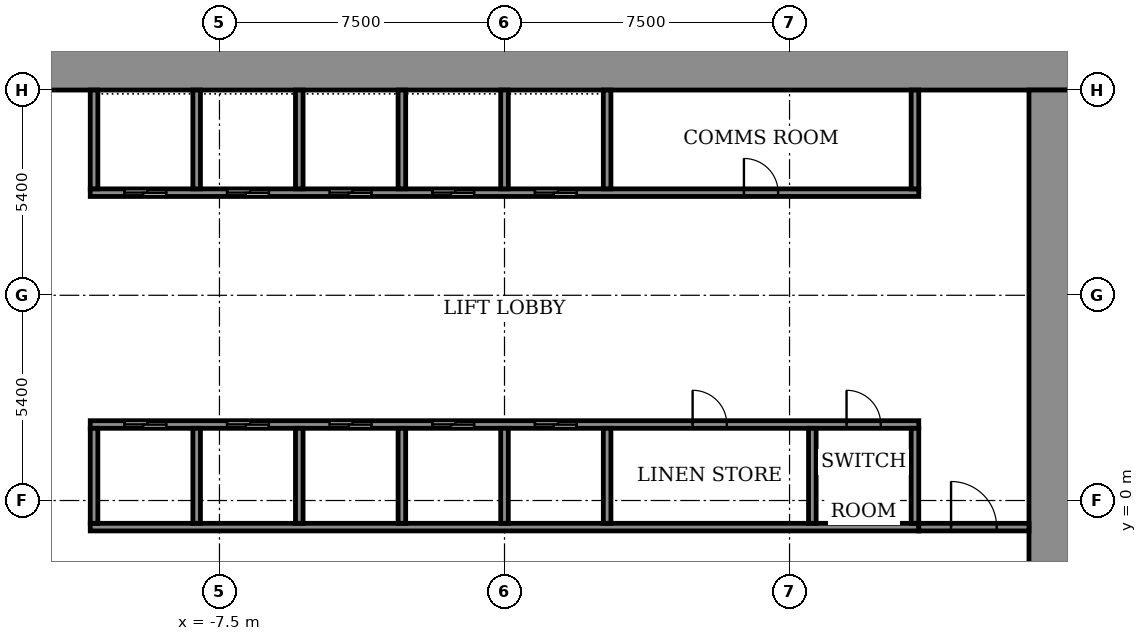
"""IFC4 building model, lengths in metres.
Left out: names, types, materials, properties, quantities, classifications, styles, units other than length and angle.
Written with IfcOpenShell. Run it as: python <this file> out.ifc"""

import sys

from ifc_helpers import new_model, si_unit, direction, frame, frame_2d, origin, place, context, subcontext, project, spatial, rectangle, extrude, element, fill, save


model = new_model("IFC4")
c1 = context("Model", 3, precision=1e-05, world=origin(), true_north=direction((0.0, 1.0)))
c2 = subcontext(c1, "Body", "Model", "MODEL_VIEW")
j1 = project(units=[si_unit("LENGTHUNIT", "METRE"), si_unit("PLANEANGLEUNIT", "RADIAN")], contexts=[c1])
p1 = place(None, origin())
s1 = spatial("IfcSite", under=j1, at=p1, CompositionType="ELEMENT")
p2 = place(p1, origin())
s2 = spatial("IfcBuilding", under=s1, at=p2, CompositionType="ELEMENT")
p3 = place(p2, frame((0.0, 0.0, 16.0)))
s3 = spatial("IfcBuildingStorey", under=s2, at=p3, CompositionType="ELEMENT", Elevation=16.0)
p4 = place(p3, frame((-15.0, 11.4, 0.0), z_axis=(0.0, 0.0, 1.0), x_axis=(1.0, 0.0, 0.0)))
e1 = element("IfcWall", 1, at=p4, inside=s3, PredefinedType="SHEAR", context=c2, shape_type="SweptSolid", body=[
    extrude(rectangle(XDim=30.0, YDim=1.2, at=frame_2d((15.0, 0.0))), origin(), (0.0, 0.0, 1.0), 4.5),
])
p5 = place(p3, frame((14.4, -10.8, 0.0), z_axis=(0.0, 0.0, 1.0), x_axis=(0.0, 1.0, 0.0)))
e2 = element("IfcWall", 2, at=p5, inside=s3, PredefinedType="SHEAR", context=c2, shape_type="SweptSolid", body=[
    extrude(rectangle(XDim=21.6, YDim=1.2, at=frame_2d((10.8, 0.0))), origin(), (0.0, 0.0, 1.0), 4.5),
])
p6 = place(p5, frame((1.2, 0.0, 0.0)))
e3 = element("IfcOpeningElement", 3, at=p6, cuts=e2, PredefinedType="OPENING", context=c2, shape_type="SweptSolid", body=[
    extrude(rectangle(XDim=1.2, YDim=2.1, at=frame_2d((0.6, 1.05))), frame((0.0, 0.61, 0.0), z_axis=(0.0, -1.0, 0.0), x_axis=(1.0, 0.0, 0.0)), (0.0, 0.0, 1.0), 1.22),
])
p7 = place(p3, frame((-10.9, -0.7, 0.0), z_axis=(0.0, 0.0, 1.0), x_axis=(1.0, 0.0, 0.0)))
e4 = element("IfcWall", 4, at=p7, inside=s3, PredefinedType="SHEAR", context=c2, shape_type="SweptSolid", body=[
    extrude(rectangle(XDim=21.8, YDim=0.2, at=frame_2d((10.9, 0.0))), origin(), (0.0, 0.0, 1.0), 3.95),
])
p8 = place(p3, frame((-10.9, 2.0, 0.0), z_axis=(0.0, 0.0, 1.0), x_axis=(1.0, 0.0, 0.0)))
e5 = element("IfcWall", 5, at=p8, inside=s3, PredefinedType="SHEAR", context=c2, shape_type="SweptSolid", body=[
    extrude(rectangle(XDim=21.8, YDim=0.2, at=frame_2d((10.9, 0.0))), origin(), (0.0, 0.0, 1.0), 3.95),
])
p9 = place(p8, frame((0.9, 0.0, 0.0)))
e6 = element("IfcOpeningElement", 6, at=p9, cuts=e5, PredefinedType="OPENING", context=c2, shape_type="SweptSolid", body=[
    extrude(rectangle(XDim=1.1, YDim=2.1, at=frame_2d((0.55, 1.05))), frame((0.0, 0.11, 0.0), z_axis=(0.0, -1.0, 0.0), x_axis=(1.0, 0.0, 0.0)), (0.0, 0.0, 1.0), 0.22),
])
p10 = place(p8, frame((3.6, 0.0, 0.0)))
e7 = element("IfcOpeningElement", 7, at=p10, cuts=e5, PredefinedType="OPENING", context=c2, shape_type="SweptSolid", body=[
    extrude(rectangle(XDim=1.1, YDim=2.1, at=frame_2d((0.55, 1.05))), frame((0.0, 0.11, 0.0), z_axis=(0.0, -1.0, 0.0), x_axis=(1.0, 0.0, 0.0)), (0.0, 0.0, 1.0), 0.22),
])
p11 = place(p8, frame((6.3, 0.0, 0.0)))
e8 = element("IfcOpeningElement", 8, at=p11, cuts=e5, PredefinedType="OPENING", context=c2, shape_type="SweptSolid", body=[
    extrude(rectangle(XDim=1.1, YDim=2.1, at=frame_2d((0.55, 1.05))), frame((0.0, 0.11, 0.0), z_axis=(0.0, -1.0, 0.0), x_axis=(1.0, 0.0, 0.0)), (0.0, 0.0, 1.0), 0.22),
])
p12 = place(p8, frame((9.0, 0.0, 0.0)))
e9 = element("IfcOpeningElement", 9, at=p12, cuts=e5, PredefinedType="OPENING", context=c2, shape_type="SweptSolid", body=[
    extrude(rectangle(XDim=1.1, YDim=2.1, at=frame_2d((0.55, 1.05))), frame((0.0, 0.11, 0.0), z_axis=(0.0, -1.0, 0.0), x_axis=(1.0, 0.0, 0.0)), (0.0, 0.0, 1.0), 0.22),
])
p13 = place(p8, frame((11.7, 0.0, 0.0)))
e10 = element("IfcOpeningElement", 10, at=p13, cuts=e5, PredefinedType="OPENING", context=c2, shape_type="SweptSolid", body=[
    extrude(rectangle(XDim=1.1, YDim=2.1, at=frame_2d((0.55, 1.05))), frame((0.0, 0.11, 0.0), z_axis=(0.0, -1.0, 0.0), x_axis=(1.0, 0.0, 0.0)), (0.0, 0.0, 1.0), 0.22),
])
p14 = place(p8, frame((15.85, 0.0, 0.0)))
e11 = element("IfcOpeningElement", 11, at=p14, cuts=e5, PredefinedType="OPENING", context=c2, shape_type="SweptSolid", body=[
    extrude(rectangle(XDim=0.9, YDim=2.1, at=frame_2d((0.45, 1.05))), frame((0.0, 0.11, 0.0), z_axis=(0.0, -1.0, 0.0), x_axis=(1.0, 0.0, 0.0)), (0.0, 0.0, 1.0), 0.22),
])
p15 = place(p8, frame((19.9, 0.0, 0.0)))
e12 = element("IfcOpeningElement", 12, at=p15, cuts=e5, PredefinedType="OPENING", context=c2, shape_type="SweptSolid", body=[
    extrude(rectangle(XDim=0.9, YDim=2.1, at=frame_2d((0.45, 1.05))), frame((0.0, 0.11, 0.0), z_axis=(0.0, -1.0, 0.0), x_axis=(1.0, 0.0, 0.0)), (0.0, 0.0, 1.0), 0.22),
])
p16 = place(p3, frame((-10.9, 8.1, 0.0), z_axis=(0.0, 0.0, 1.0), x_axis=(1.0, 0.0, 0.0)))
e13 = element("IfcWall", 13, at=p16, inside=s3, PredefinedType="SHEAR", context=c2, shape_type="SweptSolid", body=[
    extrude(rectangle(XDim=21.8, YDim=0.2, at=frame_2d((10.9, 0.0))), origin(), (0.0, 0.0, 1.0), 3.95),
])
p17 = place(p16, frame((0.9, 0.0, 0.0)))
e14 = element("IfcOpeningElement", 14, at=p17, cuts=e13, PredefinedType="OPENING", context=c2, shape_type="SweptSolid", body=[
    extrude(rectangle(XDim=1.1, YDim=2.1, at=frame_2d((0.55, 1.05))), frame((0.0, 0.11, 0.0), z_axis=(0.0, -1.0, 0.0), x_axis=(1.0, 0.0, 0.0)), (0.0, 0.0, 1.0), 0.22),
])
p18 = place(p16, frame((3.6, 0.0, 0.0)))
e15 = element("IfcOpeningElement", 15, at=p18, cuts=e13, PredefinedType="OPENING", context=c2, shape_type="SweptSolid", body=[
    extrude(rectangle(XDim=1.1, YDim=2.1, at=frame_2d((0.55, 1.05))), frame((0.0, 0.11, 0.0), z_axis=(0.0, -1.0, 0.0), x_axis=(1.0, 0.0, 0.0)), (0.0, 0.0, 1.0), 0.22),
])
p19 = place(p16, frame((6.3, 0.0, 0.0)))
e16 = element("IfcOpeningElement", 16, at=p19, cuts=e13, PredefinedType="OPENING", context=c2, shape_type="SweptSolid", body=[
    extrude(rectangle(XDim=1.1, YDim=2.1, at=frame_2d((0.55, 1.05))), frame((0.0, 0.11, 0.0), z_axis=(0.0, -1.0, 0.0), x_axis=(1.0, 0.0, 0.0)), (0.0, 0.0, 1.0), 0.22),
])
p20 = place(p16, frame((9.0, 0.0, 0.0)))
e17 = element("IfcOpeningElement", 17, at=p20, cuts=e13, PredefinedType="OPENING", context=c2, shape_type="SweptSolid", body=[
    extrude(rectangle(XDim=1.1, YDim=2.1, at=frame_2d((0.55, 1.05))), frame((0.0, 0.11, 0.0), z_axis=(0.0, -1.0, 0.0), x_axis=(1.0, 0.0, 0.0)), (0.0, 0.0, 1.0), 0.22),
])
p21 = place(p16, frame((11.7, 0.0, 0.0)))
e18 = element("IfcOpeningElement", 18, at=p21, cuts=e13, PredefinedType="OPENING", context=c2, shape_type="SweptSolid", body=[
    extrude(rectangle(XDim=1.1, YDim=2.1, at=frame_2d((0.55, 1.05))), frame((0.0, 0.11, 0.0), z_axis=(0.0, -1.0, 0.0), x_axis=(1.0, 0.0, 0.0)), (0.0, 0.0, 1.0), 0.22),
])
p22 = place(p16, frame((17.2, 0.0, 0.0)))
e19 = element("IfcOpeningElement", 19, at=p22, cuts=e13, PredefinedType="OPENING", context=c2, shape_type="SweptSolid", body=[
    extrude(rectangle(XDim=0.9, YDim=2.1, at=frame_2d((0.45, 1.05))), frame((0.0, 0.11, 0.0), z_axis=(0.0, -1.0, 0.0), x_axis=(1.0, 0.0, 0.0)), (0.0, 0.0, 1.0), 0.22),
])
for number, where, z_axis, x_axis in (
    (20, (-10.8, -0.6, 0.0), (0.0, 0.0, 1.0), (0.0, 1.0, 0.0)),
    (21, (-8.1, -0.6, 0.0), (0.0, 0.0, 1.0), (0.0, 1.0, 0.0)),
    (22, (-5.4, -0.6, 0.0), (0.0, 0.0, 1.0), (0.0, 1.0, 0.0)),
    (23, (-2.7, -0.6, 0.0), (0.0, 0.0, 1.0), (0.0, 1.0, 0.0)),
    (24, (0.0, -0.6, 0.0), (0.0, 0.0, 1.0), (0.0, 1.0, 0.0)),
    (25, (2.7, -0.6, 0.0), (0.0, 0.0, 1.0), (0.0, 1.0, 0.0)),
):
    element("IfcWall", number, at=place(p3, frame(where, z_axis=z_axis, x_axis=x_axis)), inside=s3, PredefinedType="SHEAR", context=c2, shape_type="SweptSolid", body=[
        extrude(rectangle(XDim=2.5, YDim=0.2, at=frame_2d((1.25, 0.0))), origin(), (0.0, 0.0, 1.0), 3.95),
    ])
for number, where, z_axis, x_axis in (
    (26, (8.1, -0.6, 0.0), (0.0, 0.0, 1.0), (0.0, 1.0, 0.0)),
    (27, (10.8, -0.6, 0.0), (0.0, 0.0, 1.0), (0.0, 1.0, 0.0)),
):
    element("IfcWall", number, at=place(p3, frame(where, z_axis=z_axis, x_axis=x_axis)), inside=s3, PredefinedType="STANDARD", context=c2, shape_type="SweptSolid", body=[
        extrude(rectangle(XDim=2.5, YDim=0.2, at=frame_2d((1.25, 0.0))), origin(), (0.0, 0.0, 1.0), 3.95),
    ])
for number, where, z_axis, x_axis in (
    (28, (-10.8, 8.2, 0.0), (0.0, 0.0, 1.0), (0.0, 1.0, 0.0)),
    (29, (-8.1, 8.2, 0.0), (0.0, 0.0, 1.0), (0.0, 1.0, 0.0)),
    (30, (-5.4, 8.2, 0.0), (0.0, 0.0, 1.0), (0.0, 1.0, 0.0)),
    (31, (-2.7, 8.2, 0.0), (0.0, 0.0, 1.0), (0.0, 1.0, 0.0)),
    (32, (0.0, 8.2, 0.0), (0.0, 0.0, 1.0), (0.0, 1.0, 0.0)),
    (33, (2.7, 8.2, 0.0), (0.0, 0.0, 1.0), (0.0, 1.0, 0.0)),
):
    element("IfcWall", number, at=place(p3, frame(where, z_axis=z_axis, x_axis=x_axis)), inside=s3, PredefinedType="SHEAR", context=c2, shape_type="SweptSolid", body=[
        extrude(rectangle(XDim=2.6, YDim=0.2, at=frame_2d((1.3, 0.0))), origin(), (0.0, 0.0, 1.0), 3.95),
    ])
p23 = place(p3, frame((10.8, 8.2, 0.0), z_axis=(0.0, 0.0, 1.0), x_axis=(0.0, 1.0, 0.0)))
e34 = element("IfcWall", 34, at=p23, inside=s3, PredefinedType="STANDARD", context=c2, shape_type="SweptSolid", body=[
    extrude(rectangle(XDim=2.6, YDim=0.2, at=frame_2d((1.3, 0.0))), origin(), (0.0, 0.0, 1.0), 3.95),
])
p24 = place(p3, frame((10.9, -0.7, 0.0), z_axis=(0.0, 0.0, 1.0), x_axis=(1.0, 0.0, 0.0)))
e35 = element("IfcWall", 35, at=p24, inside=s3, PredefinedType="STANDARD", context=c2, shape_type="SweptSolid", body=[
    extrude(rectangle(XDim=2.9, YDim=0.2, at=frame_2d((1.45, 0.0))), origin(), (0.0, 0.0, 1.0), 3.95),
])
p25 = place(p24, frame((0.85, 0.0, 0.0)))
e36 = element("IfcOpeningElement", 36, at=p25, cuts=e35, PredefinedType="OPENING", context=c2, shape_type="SweptSolid", body=[
    extrude(rectangle(XDim=1.2, YDim=2.1, at=frame_2d((0.6, 1.05))), frame((0.0, 0.11, 0.0), z_axis=(0.0, -1.0, 0.0), x_axis=(1.0, 0.0, 0.0)), (0.0, 0.0, 1.0), 0.22),
])
p26 = place(p9, origin())
e37 = element("IfcDoor", 37, at=p26, inside=s3, OperationType="SLIDING_TO_LEFT", PredefinedType="DOOR", context=c2, shape_type="SweptSolid", body=[
    extrude(rectangle(XDim=1.1, YDim=2.1, at=frame_2d((0.55, 1.05))), frame((0.0, 0.025, 0.0), z_axis=(0.0, -1.0, 0.0), x_axis=(1.0, 0.0, 0.0)), (0.0, 0.0, 1.0), 0.05),
])
fill(e6, e37)
p27 = place(p10, origin())
e38 = element("IfcDoor", 38, at=p27, inside=s3, OperationType="SLIDING_TO_LEFT", PredefinedType="DOOR", context=c2, shape_type="SweptSolid", body=[
    extrude(rectangle(XDim=1.1, YDim=2.1, at=frame_2d((0.55, 1.05))), frame((0.0, 0.025, 0.0), z_axis=(0.0, -1.0, 0.0), x_axis=(1.0, 0.0, 0.0)), (0.0, 0.0, 1.0), 0.05),
])
fill(e7, e38)
p28 = place(p11, origin())
e39 = element("IfcDoor", 39, at=p28, inside=s3, OperationType="SLIDING_TO_LEFT", PredefinedType="DOOR", context=c2, shape_type="SweptSolid", body=[
    extrude(rectangle(XDim=1.1, YDim=2.1, at=frame_2d((0.55, 1.05))), frame((0.0, 0.025, 0.0), z_axis=(0.0, -1.0, 0.0), x_axis=(1.0, 0.0, 0.0)), (0.0, 0.0, 1.0), 0.05),
])
fill(e8, e39)
p29 = place(p12, origin())
e40 = element("IfcDoor", 40, at=p29, inside=s3, OperationType="SLIDING_TO_LEFT", PredefinedType="DOOR", context=c2, shape_type="SweptSolid", body=[
    extrude(rectangle(XDim=1.1, YDim=2.1, at=frame_2d((0.55, 1.05))), frame((0.0, 0.025, 0.0), z_axis=(0.0, -1.0, 0.0), x_axis=(1.0, 0.0, 0.0)), (0.0, 0.0, 1.0), 0.05),
])
fill(e9, e40)
p30 = place(p13, origin())
e41 = element("IfcDoor", 41, at=p30, inside=s3, OperationType="SLIDING_TO_LEFT", PredefinedType="DOOR", context=c2, shape_type="SweptSolid", body=[
    extrude(rectangle(XDim=1.1, YDim=2.1, at=frame_2d((0.55, 1.05))), frame((0.0, 0.025, 0.0), z_axis=(0.0, -1.0, 0.0), x_axis=(1.0, 0.0, 0.0)), (0.0, 0.0, 1.0), 0.05),
])
fill(e10, e41)
p31 = place(p17, origin())
e42 = element("IfcDoor", 42, at=p31, inside=s3, OperationType="SLIDING_TO_LEFT", PredefinedType="DOOR", context=c2, shape_type="SweptSolid", body=[
    extrude(rectangle(XDim=1.1, YDim=2.1, at=frame_2d((0.55, 1.05))), frame((0.0, 0.025, 0.0), z_axis=(0.0, -1.0, 0.0), x_axis=(1.0, 0.0, 0.0)), (0.0, 0.0, 1.0), 0.05),
])
fill(e14, e42)
p32 = place(p18, origin())
e43 = element("IfcDoor", 43, at=p32, inside=s3, OperationType="SLIDING_TO_LEFT", PredefinedType="DOOR", context=c2, shape_type="SweptSolid", body=[
    extrude(rectangle(XDim=1.1, YDim=2.1, at=frame_2d((0.55, 1.05))), frame((0.0, 0.025, 0.0), z_axis=(0.0, -1.0, 0.0), x_axis=(1.0, 0.0, 0.0)), (0.0, 0.0, 1.0), 0.05),
])
fill(e15, e43)
p33 = place(p19, origin())
e44 = element("IfcDoor", 44, at=p33, inside=s3, OperationType="SLIDING_TO_LEFT", PredefinedType="DOOR", context=c2, shape_type="SweptSolid", body=[
    extrude(rectangle(XDim=1.1, YDim=2.1, at=frame_2d((0.55, 1.05))), frame((0.0, 0.025, 0.0), z_axis=(0.0, -1.0, 0.0), x_axis=(1.0, 0.0, 0.0)), (0.0, 0.0, 1.0), 0.05),
])
fill(e16, e44)
p34 = place(p20, origin())
e45 = element("IfcDoor", 45, at=p34, inside=s3, OperationType="SLIDING_TO_LEFT", PredefinedType="DOOR", context=c2, shape_type="SweptSolid", body=[
    extrude(rectangle(XDim=1.1, YDim=2.1, at=frame_2d((0.55, 1.05))), frame((0.0, 0.025, 0.0), z_axis=(0.0, -1.0, 0.0), x_axis=(1.0, 0.0, 0.0)), (0.0, 0.0, 1.0), 0.05),
])
fill(e17, e45)
p35 = place(p21, origin())
e46 = element("IfcDoor", 46, at=p35, inside=s3, OperationType="SLIDING_TO_LEFT", PredefinedType="DOOR", context=c2, shape_type="SweptSolid", body=[
    extrude(rectangle(XDim=1.1, YDim=2.1, at=frame_2d((0.55, 1.05))), frame((0.0, 0.025, 0.0), z_axis=(0.0, -1.0, 0.0), x_axis=(1.0, 0.0, 0.0)), (0.0, 0.0, 1.0), 0.05),
])
fill(e18, e46)
p36 = place(p14, origin())
e47 = element("IfcDoor", 47, at=p36, inside=s3, OperationType="SINGLE_SWING_RIGHT", PredefinedType="DOOR", context=c2, shape_type="SweptSolid", body=[
    extrude(rectangle(XDim=0.9, YDim=2.1, at=frame_2d((0.45, 1.05))), frame((0.0, 0.025, 0.0), z_axis=(0.0, -1.0, 0.0), x_axis=(1.0, 0.0, 0.0)), (0.0, 0.0, 1.0), 0.05),
])
fill(e11, e47)
p37 = place(p15, origin())
e48 = element("IfcDoor", 48, at=p37, inside=s3, OperationType="SINGLE_SWING_LEFT", PredefinedType="DOOR", context=c2, shape_type="SweptSolid", body=[
    extrude(rectangle(XDim=0.9, YDim=2.1, at=frame_2d((0.45, 1.05))), frame((0.0, 0.025, 0.0), z_axis=(0.0, -1.0, 0.0), x_axis=(1.0, 0.0, 0.0)), (0.0, 0.0, 1.0), 0.05),
])
fill(e12, e48)
p38 = place(p22, origin())
e49 = element("IfcDoor", 49, at=p38, inside=s3, OperationType="SINGLE_SWING_LEFT", PredefinedType="DOOR", context=c2, shape_type="SweptSolid", body=[
    extrude(rectangle(XDim=0.9, YDim=2.1, at=frame_2d((0.45, 1.05))), frame((0.0, 0.025, 0.0), z_axis=(0.0, -1.0, 0.0), x_axis=(1.0, 0.0, 0.0)), (0.0, 0.0, 1.0), 0.05),
])
fill(e19, e49)
p39 = place(p25, origin())
e50 = element("IfcDoor", 50, at=p39, inside=s3, OperationType="SINGLE_SWING_LEFT", PredefinedType="DOOR", context=c2, shape_type="SweptSolid", body=[
    extrude(rectangle(XDim=1.2, YDim=2.1, at=frame_2d((0.6, 1.05))), frame((0.0, 0.025, 0.0), z_axis=(0.0, -1.0, 0.0), x_axis=(1.0, 0.0, 0.0)), (0.0, 0.0, 1.0), 0.05),
])
fill(e36, e50)
save(model, sys.argv[1])
